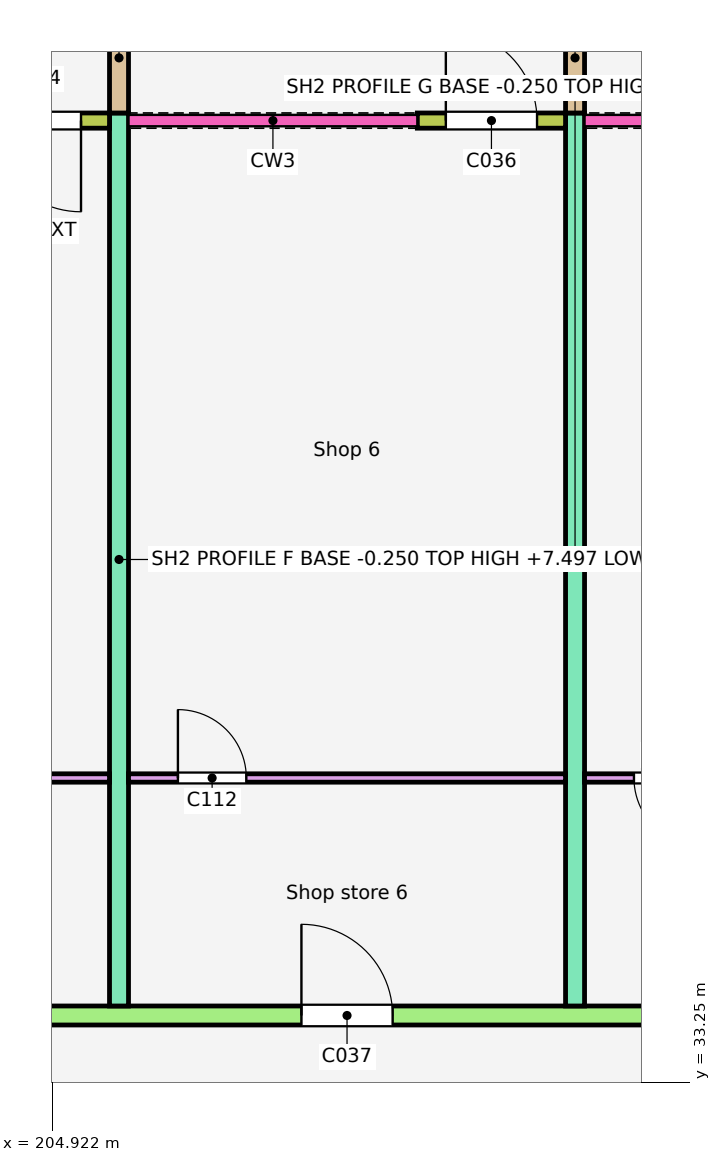
"""IFC4 building model, lengths in metres.
Left out: names, types, materials, properties, quantities, classifications, styles, units other than length and angle.
Written with IfcOpenShell. Run it as: python <this file> out.ifc"""

import sys

from ifc_helpers import new_model, si_unit, direction, frame, frame_2d, origin, place, context, subcontext, project, spatial, polyline, rectangle, outline, extrude, element, fill, save


model = new_model("IFC4")
c1 = context("Model", 3, precision=1e-05, world=origin(), true_north=direction((0.0, 1.0)))
c2 = subcontext(c1, "Body", "Model", "MODEL_VIEW")
j1 = project(units=[si_unit("LENGTHUNIT", "METRE"), si_unit("PLANEANGLEUNIT", "RADIAN")], contexts=[c1])
p1 = place(None, origin())
s1 = spatial("IfcSite", under=j1, at=p1, CompositionType="ELEMENT")
p2 = place(p1, origin())
s2 = spatial("IfcBuilding", under=s1, at=p2, CompositionType="ELEMENT")
p3 = place(p2, origin())
s3 = spatial("IfcBuildingStorey", under=s2, at=p3, CompositionType="ELEMENT", Elevation=0.0)
p4 = place(p3, frame((175.8, 34.125, -0.25), z_axis=(0.0, 0.0, 1.0), x_axis=(1.0, 0.0, 0.0)))
e1 = element("IfcWall", 1, at=p4, inside=s3, PredefinedType="SOLIDWALL", context=c2, shape_type="SweptSolid", body=[
    extrude(rectangle(XDim=56.0, YDim=0.25, at=frame_2d((28.0, 0.0))), origin(), (0.0, 0.0, 1.0), 4.445),
])
p5 = place(p4, frame((2.462, 0.0, 0.25)))
e2 = element("IfcOpeningElement", 2, at=p5, cuts=e1, PredefinedType="OPENING", context=c2, shape_type="SweptSolid", body=[
    extrude(rectangle(XDim=1.2, YDim=2.1, at=frame_2d((0.6, 1.05))), frame((0.0, 0.135, 0.0), z_axis=(0.0, -1.0, 0.0), x_axis=(1.0, 0.0, 0.0)), (0.0, 0.0, 1.0), 0.27),
])
p6 = place(p4, frame((8.4, 0.0, 0.25)))
e3 = element("IfcOpeningElement", 3, at=p6, cuts=e1, PredefinedType="OPENING", context=c2, shape_type="SweptSolid", body=[
    extrude(rectangle(XDim=1.2, YDim=2.1, at=frame_2d((0.6, 1.05))), frame((0.0, 0.135, 0.0), z_axis=(0.0, -1.0, 0.0), x_axis=(1.0, 0.0, 0.0)), (0.0, 0.0, 1.0), 0.27),
])
p7 = place(p4, frame((14.4, 0.0, 0.25)))
e4 = element("IfcOpeningElement", 4, at=p7, cuts=e1, PredefinedType="OPENING", context=c2, shape_type="SweptSolid", body=[
    extrude(rectangle(XDim=1.2, YDim=2.1, at=frame_2d((0.6, 1.05))), frame((0.0, 0.135, 0.0), z_axis=(0.0, -1.0, 0.0), x_axis=(1.0, 0.0, 0.0)), (0.0, 0.0, 1.0), 0.27),
])
p8 = place(p4, frame((20.4, 0.0, 0.25)))
e5 = element("IfcOpeningElement", 5, at=p8, cuts=e1, PredefinedType="OPENING", context=c2, shape_type="SweptSolid", body=[
    extrude(rectangle(XDim=1.2, YDim=2.1, at=frame_2d((0.6, 1.05))), frame((0.0, 0.135, 0.0), z_axis=(0.0, -1.0, 0.0), x_axis=(1.0, 0.0, 0.0)), (0.0, 0.0, 1.0), 0.27),
])
p9 = place(p4, frame((26.4, 0.0, 0.25)))
e6 = element("IfcOpeningElement", 6, at=p9, cuts=e1, PredefinedType="OPENING", context=c2, shape_type="SweptSolid", body=[
    extrude(rectangle(XDim=1.2, YDim=2.1, at=frame_2d((0.6, 1.05))), frame((0.0, 0.135, 0.0), z_axis=(0.0, -1.0, 0.0), x_axis=(1.0, 0.0, 0.0)), (0.0, 0.0, 1.0), 0.27),
])
p10 = place(p4, frame((32.4, 0.0, 0.25)))
e7 = element("IfcOpeningElement", 7, at=p10, cuts=e1, PredefinedType="OPENING", context=c2, shape_type="SweptSolid", body=[
    extrude(rectangle(XDim=1.2, YDim=2.1, at=frame_2d((0.6, 1.05))), frame((0.0, 0.135, 0.0), z_axis=(0.0, -1.0, 0.0), x_axis=(1.0, 0.0, 0.0)), (0.0, 0.0, 1.0), 0.27),
])
p11 = place(p4, frame((38.4, 0.0, 0.25)))
e8 = element("IfcOpeningElement", 8, at=p11, cuts=e1, PredefinedType="OPENING", context=c2, shape_type="SweptSolid", body=[
    extrude(rectangle(XDim=1.2, YDim=2.1, at=frame_2d((0.6, 1.05))), frame((0.0, 0.135, 0.0), z_axis=(0.0, -1.0, 0.0), x_axis=(1.0, 0.0, 0.0)), (0.0, 0.0, 1.0), 0.27),
])
p12 = place(p4, frame((44.4, 0.0, 0.25)))
e9 = element("IfcOpeningElement", 9, at=p12, cuts=e1, PredefinedType="OPENING", context=c2, shape_type="SweptSolid", body=[
    extrude(rectangle(XDim=1.2, YDim=2.1, at=frame_2d((0.6, 1.05))), frame((0.0, 0.135, 0.0), z_axis=(0.0, -1.0, 0.0), x_axis=(1.0, 0.0, 0.0)), (0.0, 0.0, 1.0), 0.27),
])
p13 = place(p4, frame((49.5, 0.0, 0.25)))
e10 = element("IfcOpeningElement", 10, at=p13, cuts=e1, PredefinedType="OPENING", context=c2, shape_type="SweptSolid", body=[
    extrude(rectangle(XDim=1.2, YDim=2.1, at=frame_2d((0.6, 1.05))), frame((0.0, 0.135, 0.0), z_axis=(0.0, -1.0, 0.0), x_axis=(1.0, 0.0, 0.0)), (0.0, 0.0, 1.0), 0.27),
])
p14 = place(p4, frame((53.3, 0.0, 0.25)))
e11 = element("IfcOpeningElement", 11, at=p14, cuts=e1, PredefinedType="OPENING", context=c2, shape_type="SweptSolid", body=[
    extrude(rectangle(XDim=1.0, YDim=2.1, at=frame_2d((0.5, 1.05))), frame((0.0, 0.135, 0.0), z_axis=(0.0, -1.0, 0.0), x_axis=(1.0, 0.0, 0.0)), (0.0, 0.0, 1.0), 0.27),
])
for number, where, z_axis, x_axis in (
    (12, (205.8, 34.25, -0.25), (0.0, 0.0, 1.0), (0.0, 1.0, 0.0)),
    (13, (211.8, 34.25, -0.25), (0.0, 0.0, 1.0), (0.0, 1.0, 0.0)),
):
    element("IfcWall", number, at=place(p3, frame(where, z_axis=z_axis, x_axis=x_axis)), inside=s3, PredefinedType="SOLIDWALL", context=c2, shape_type="SweptSolid", body=[
        extrude(outline(polyline([(0.0, 0.0), (11.75, 0.0), (11.55, 7.663), (7.726, 4.447), (7.725, 7.747), (3.801, 4.447), (3.8, 7.747), (0.0, 4.552), (0.0, 0.0)])), frame((0.0, 0.125, 0.0), z_axis=(0.0, -1.0, 0.0), x_axis=(1.0, 0.0, 0.0)), (0.0, 0.0, 1.0), 0.25),
    ])
p15 = place(p3, frame((203.725, 45.9, -0.25), z_axis=(0.0, 0.0, 1.0), x_axis=(1.0, 0.0, 0.0)))
e14 = element("IfcWall", 14, at=p15, inside=s3, PredefinedType="SOLIDWALL", context=c2, shape_type="SweptSolid", body=[
    extrude(rectangle(XDim=1.95, YDim=0.2, at=frame_2d((0.975, 0.0))), origin(), (0.0, 0.0, 1.0), 4.45),
])
p16 = place(p15, frame((0.375, 0.0, 0.25)))
e15 = element("IfcOpeningElement", 15, at=p16, cuts=e14, PredefinedType="OPENING", context=c2, shape_type="SweptSolid", body=[
    extrude(rectangle(XDim=1.2, YDim=2.1, at=frame_2d((0.6, 1.05))), frame((0.0, 0.11, 0.0), z_axis=(0.0, -1.0, 0.0), x_axis=(1.0, 0.0, 0.0)), (0.0, 0.0, 1.0), 0.22),
])
p17 = place(p3, frame((209.725, 45.9, -0.25), z_axis=(0.0, 0.0, 1.0), x_axis=(1.0, 0.0, 0.0)))
e16 = element("IfcWall", 16, at=p17, inside=s3, PredefinedType="SOLIDWALL", context=c2, shape_type="SweptSolid", body=[
    extrude(rectangle(XDim=1.95, YDim=0.2, at=frame_2d((0.975, 0.0))), origin(), (0.0, 0.0, 1.0), 4.45),
])
p18 = place(p17, frame((0.375, 0.0, 0.25)))
e17 = element("IfcOpeningElement", 17, at=p18, cuts=e16, PredefinedType="OPENING", context=c2, shape_type="SweptSolid", body=[
    extrude(rectangle(XDim=1.2, YDim=2.1, at=frame_2d((0.6, 1.05))), frame((0.0, 0.11, 0.0), z_axis=(0.0, -1.0, 0.0), x_axis=(1.0, 0.0, 0.0)), (0.0, 0.0, 1.0), 0.22),
])
for number, where, z_axis, x_axis in (
    (18, (205.8, 46.0, -0.25), (0.0, 0.0, 1.0), (0.0, 1.0, 0.0)),
    (19, (211.8, 46.0, -0.25), (0.0, 0.0, 1.0), (0.0, 1.0, 0.0)),
):
    element("IfcWall", number, at=place(p3, frame(where, z_axis=z_axis, x_axis=x_axis)), inside=s3, PredefinedType="SOLIDWALL", context=c2, shape_type="SweptSolid", body=[
        extrude(outline(polyline([(0.0, 0.0), (1.45, 0.0), (1.45, 4.36), (0.0, 4.447), (0.0, 0.0)])), frame((0.0, 0.125, 0.0), z_axis=(0.0, -1.0, 0.0), x_axis=(1.0, 0.0, 0.0)), (0.0, 0.0, 1.0), 0.25),
    ])
p19 = place(p3, frame((199.925, 37.25, 0.0), z_axis=(0.0, 0.0, 1.0), x_axis=(1.0, 0.0, 0.0)))
e20 = element("IfcWall", 20, at=p19, inside=s3, PredefinedType="PARTITIONING", context=c2, shape_type="SweptSolid", body=[
    extrude(rectangle(XDim=5.75, YDim=0.11, at=frame_2d((2.875, 0.0))), origin(), (0.0, 0.0, 1.0), 3.0),
])
p20 = place(p19, frame((0.65, 0.0, 0.0)))
e21 = element("IfcOpeningElement", 21, at=p20, cuts=e20, PredefinedType="OPENING", context=c2, shape_type="SweptSolid", body=[
    extrude(rectangle(XDim=0.9, YDim=2.1, at=frame_2d((0.45, 1.05))), frame((0.0, 0.065, 0.0), z_axis=(0.0, -1.0, 0.0), x_axis=(1.0, 0.0, 0.0)), (0.0, 0.0, 1.0), 0.13),
])
p21 = place(p3, frame((205.925, 37.25, 0.0), z_axis=(0.0, 0.0, 1.0), x_axis=(1.0, 0.0, 0.0)))
e22 = element("IfcWall", 22, at=p21, inside=s3, PredefinedType="PARTITIONING", context=c2, shape_type="SweptSolid", body=[
    extrude(rectangle(XDim=5.75, YDim=0.11, at=frame_2d((2.875, 0.0))), origin(), (0.0, 0.0, 1.0), 3.0),
])
p22 = place(p21, frame((0.65, 0.0, 0.0)))
e23 = element("IfcOpeningElement", 23, at=p22, cuts=e22, PredefinedType="OPENING", context=c2, shape_type="SweptSolid", body=[
    extrude(rectangle(XDim=0.9, YDim=2.1, at=frame_2d((0.45, 1.05))), frame((0.0, 0.065, 0.0), z_axis=(0.0, -1.0, 0.0), x_axis=(1.0, 0.0, 0.0)), (0.0, 0.0, 1.0), 0.13),
])
p23 = place(p3, frame((211.925, 37.25, 0.0), z_axis=(0.0, 0.0, 1.0), x_axis=(1.0, 0.0, 0.0)))
e24 = element("IfcWall", 24, at=p23, inside=s3, PredefinedType="PARTITIONING", context=c2, shape_type="SweptSolid", body=[
    extrude(rectangle(XDim=5.75, YDim=0.11, at=frame_2d((2.875, 0.0))), origin(), (0.0, 0.0, 1.0), 3.0),
])
p24 = place(p23, frame((0.65, 0.0, 0.0)))
e25 = element("IfcOpeningElement", 25, at=p24, cuts=e24, PredefinedType="OPENING", context=c2, shape_type="SweptSolid", body=[
    extrude(rectangle(XDim=0.9, YDim=2.1, at=frame_2d((0.45, 1.05))), frame((0.0, 0.065, 0.0), z_axis=(0.0, -1.0, 0.0), x_axis=(1.0, 0.0, 0.0)), (0.0, 0.0, 1.0), 0.13),
])
p25 = place(p16, origin())
e26 = element("IfcDoor", 26, at=p25, inside=s3, OperationType="SINGLE_SWING_RIGHT", PredefinedType="DOOR", context=c2, shape_type="SweptSolid", body=[
    extrude(rectangle(XDim=1.2, YDim=2.1, at=frame_2d((0.6, 1.05))), frame((0.0, 0.025, 0.0), z_axis=(0.0, -1.0, 0.0), x_axis=(1.0, 0.0, 0.0)), (0.0, 0.0, 1.0), 0.05),
])
fill(e15, e26)
p26 = place(p18, origin())
e27 = element("IfcDoor", 27, at=p26, inside=s3, OperationType="SINGLE_SWING_LEFT", PredefinedType="DOOR", context=c2, shape_type="SweptSolid", body=[
    extrude(rectangle(XDim=1.2, YDim=2.1, at=frame_2d((0.6, 1.05))), frame((0.0, 0.025, 0.0), z_axis=(0.0, -1.0, 0.0), x_axis=(1.0, 0.0, 0.0)), (0.0, 0.0, 1.0), 0.05),
])
fill(e17, e27)
p27 = place(p10, origin())
e28 = element("IfcDoor", 28, at=p27, inside=s3, OperationType="SINGLE_SWING_LEFT", PredefinedType="DOOR", context=c2, shape_type="SweptSolid", body=[
    extrude(rectangle(XDim=1.2, YDim=2.1, at=frame_2d((0.6, 1.05))), frame((0.0, 0.025, 0.0), z_axis=(0.0, -1.0, 0.0), x_axis=(1.0, 0.0, 0.0)), (0.0, 0.0, 1.0), 0.05),
])
fill(e7, e28)
p28 = place(p22, origin())
e29 = element("IfcDoor", 29, at=p28, inside=s3, OperationType="SINGLE_SWING_LEFT", PredefinedType="DOOR", context=c2, shape_type="SweptSolid", body=[
    extrude(rectangle(XDim=0.9, YDim=2.1, at=frame_2d((0.45, 1.05))), frame((0.0, 0.025, 0.0), z_axis=(0.0, -1.0, 0.0), x_axis=(1.0, 0.0, 0.0)), (0.0, 0.0, 1.0), 0.05),
])
fill(e23, e29)
p29 = place(p24, origin())
e30 = element("IfcDoor", 30, at=p29, inside=s3, OperationType="SINGLE_SWING_RIGHT", PredefinedType="DOOR", context=c2, shape_type="SweptSolid", body=[
    extrude(rectangle(XDim=0.9, YDim=2.1, at=frame_2d((0.45, 1.05))), frame((0.0, 0.025, 0.0), z_axis=(0.0, -1.0, 0.0), x_axis=(1.0, 0.0, 0.0)), (0.0, 0.0, 1.0), 0.05),
])
fill(e25, e30)
save(model, sys.argv[1])
